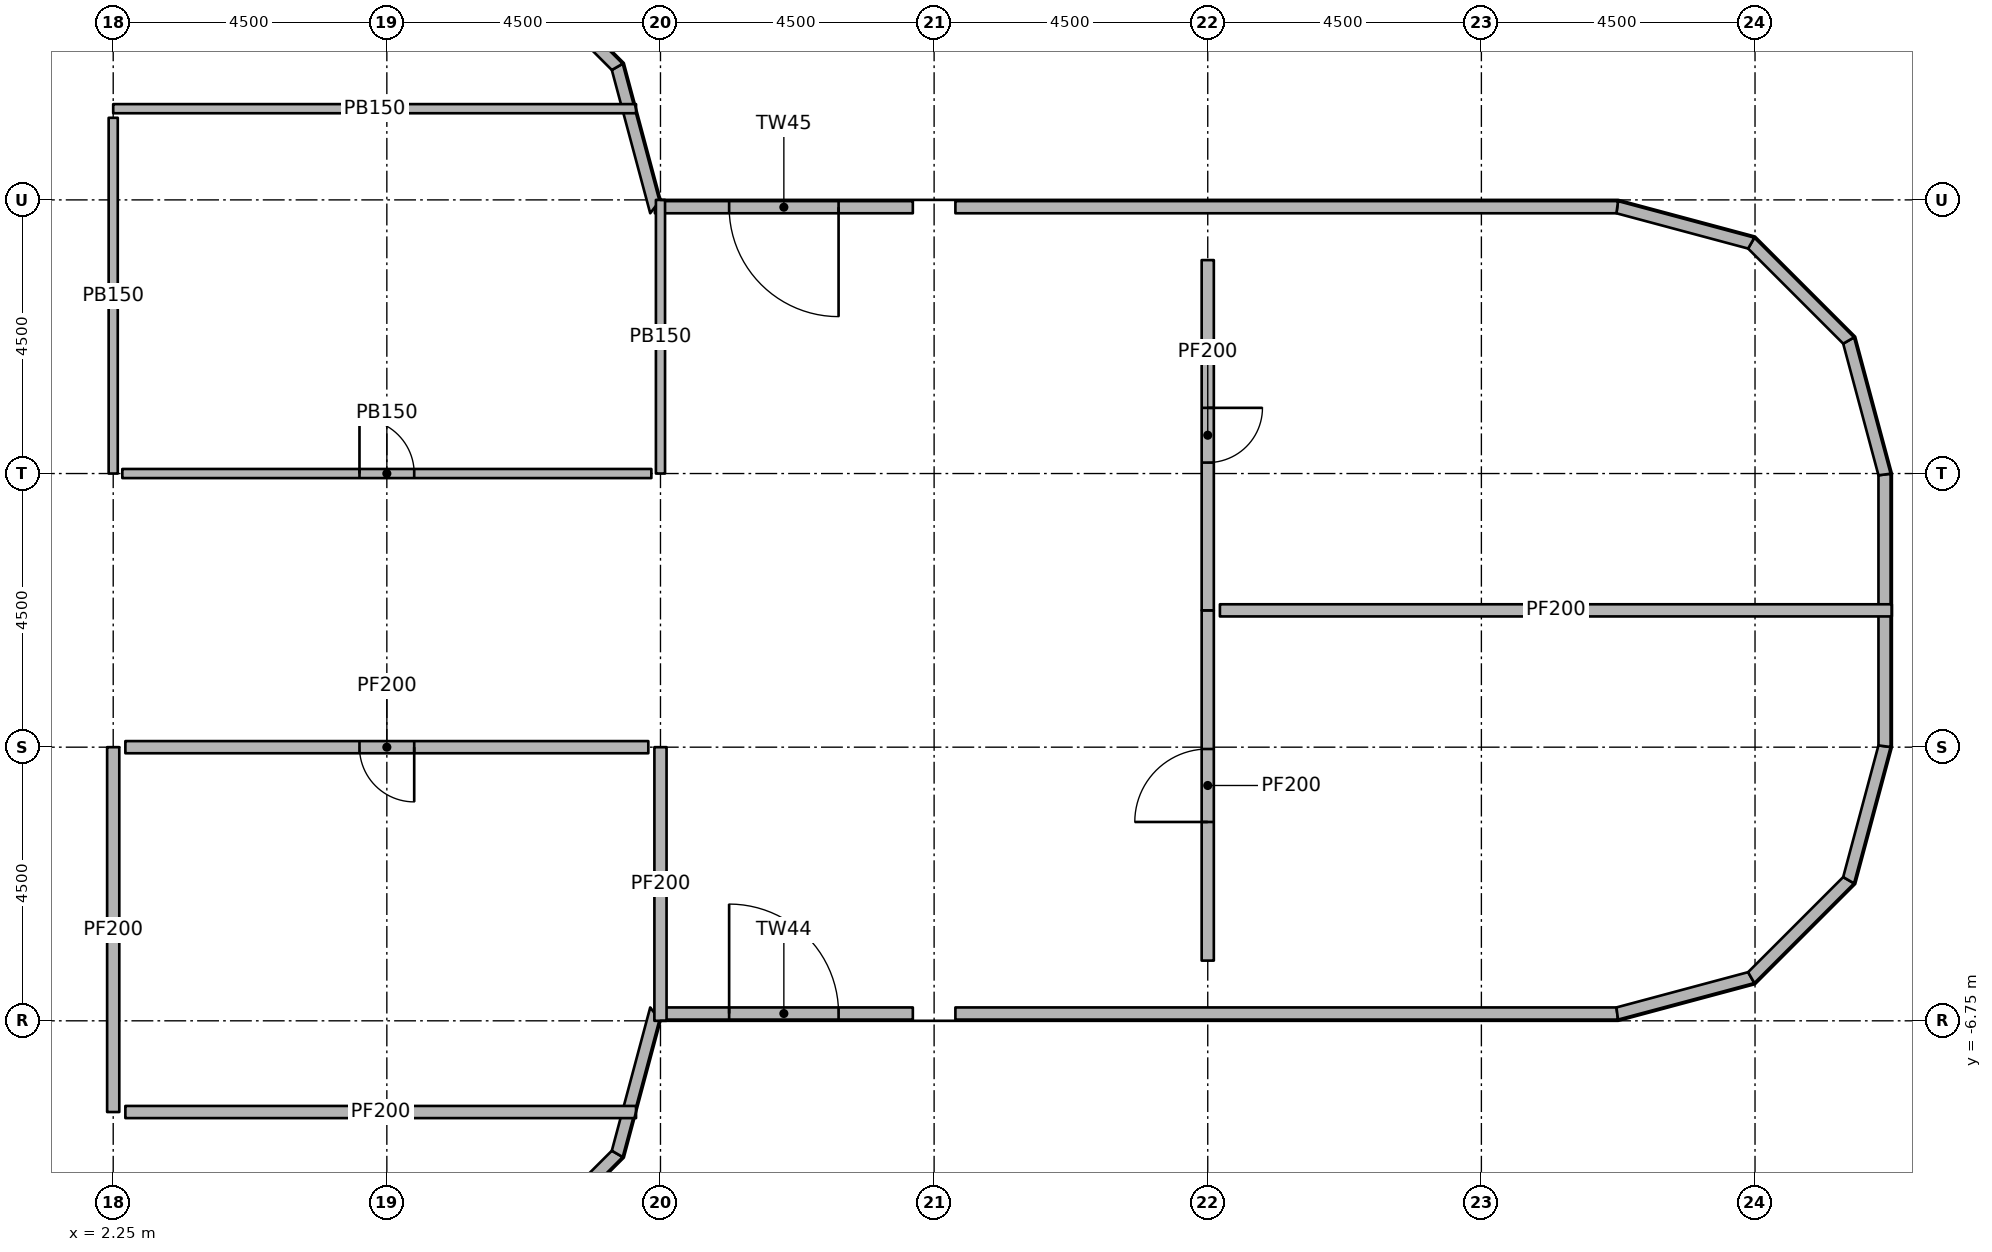
"""IFC4 building model, lengths in metres.
Left out: names, types, materials, properties, quantities, classifications, styles, units other than length and angle.
Written with IfcOpenShell. Run it as: python <this file> out.ifc"""

import sys

from ifc_helpers import new_model, si_unit, direction, frame, frame_2d, origin, origin_2d, place, context, subcontext, project, spatial, polyline, rectangle, outline, extrude, element, fill, save


model = new_model("IFC4")
c1 = context("Model", 3, precision=1e-05, world=origin(), true_north=direction((0.0, 1.0)))
c2 = subcontext(c1, "Body", "Model", "MODEL_VIEW")
j1 = project(units=[si_unit("LENGTHUNIT", "METRE"), si_unit("PLANEANGLEUNIT", "RADIAN")], contexts=[c1])
p1 = place(None, origin())
s1 = spatial("IfcSite", under=j1, at=p1, CompositionType="ELEMENT")
p2 = place(p1, origin())
s2 = spatial("IfcBuilding", under=s1, at=p2, CompositionType="ELEMENT")
p3 = place(p2, frame((0.0, 0.0, 244.8)))
s3 = spatial("IfcBuildingStorey", under=s2, at=p3, CompositionType="ELEMENT", Elevation=244.8)
for number, where, z_axis, x_axis in (
    (1, (6.25, -6.25, 0.0), (0.0, 0.0, 1.0), (1.0, 0.0, 0.0)),
    (2, (6.25, 6.25, 0.0), (0.0, 0.0, 1.0), (1.0, 0.0, 0.0)),
    (3, (10.75, -6.25, 0.0), (0.0, 0.0, 1.0), (1.0, 0.0, 0.0)),
    (4, (10.75, 6.25, 0.0), (0.0, 0.0, 1.0), (1.0, 0.0, 0.0)),
    (5, (15.75, -6.25, 0.0), (0.0, 0.0, 1.0), (1.0, 0.0, 0.0)),
    (6, (15.75, 6.25, 0.0), (0.0, 0.0, 1.0), (1.0, 0.0, 0.0)),
    (7, (20.25, -6.11, 0.0), (0.0, 0.0, 1.0), (1.0, 0.0, 0.0)),
    (8, (20.25, 6.11, 0.0), (0.0, 0.0, 1.0), (1.0, 0.0, 0.0)),
    (9, (24.75, -6.11, 0.0), (0.0, 0.0, 1.0), (1.0, 0.0, 0.0)),
    (10, (24.75, 6.11, 0.0), (0.0, 0.0, 1.0), (1.0, 0.0, 0.0)),
    (11, (28.908, -5.475, 0.0), (0.0, 0.0, 1.0), (1.0, 0.0, 0.0)),
    (12, (28.67, -2.25, 0.0), (0.0, 0.0, 1.0), (1.0, 0.0, 0.0)),
    (13, (28.67, 2.25, 0.0), (0.0, 0.0, 1.0), (1.0, 0.0, 0.0)),
    (14, (28.908, 5.475, 0.0), (0.0, 0.0, 1.0), (1.0, 0.0, 0.0)),
):
    element("IfcColumn", number, at=place(p3, frame(where, z_axis=z_axis, x_axis=x_axis)), inside=s3, PredefinedType="COLUMN", context=c2, shape_type="SweptSolid", body=[
        extrude(rectangle(XDim=0.7, YDim=0.7, at=origin_2d()), origin(), (0.0, 0.0, 1.0), 4.85),
    ])
p4 = place(p3, origin())
e15 = element("IfcWall", 15, at=p4, inside=s3, PredefinedType="SOLIDWALL", context=c2, shape_type="SweptSolid", body=[
    extrude(outline(polyline([(8.99, -10.629), (10.629, -8.99), (10.45, -8.886), (8.886, -10.45), (8.99, -10.629)])), origin(), (0.0, 0.0, 1.0), 4.85),
])
p5 = place(p3, origin())
e16 = element("IfcWall", 16, at=p5, inside=s3, PredefinedType="SOLIDWALL", context=c2, shape_type="SweptSolid", body=[
    extrude(outline(polyline([(10.629, -8.99), (11.235, -6.73), (11.081, -6.53), (10.45, -8.886), (10.629, -8.99)])), origin(), (0.0, 0.0, 1.0), 4.85),
])
p6 = place(p3, frame((11.158, -6.63, 0.0), z_axis=(0.0, 0.0, 1.0), x_axis=(1.0, 0.0, 0.0)))
e17 = element("IfcWall", 17, at=p6, inside=s3, PredefinedType="SOLIDWALL", context=c2, shape_type="SweptSolid", body=[
    extrude(rectangle(XDim=4.242, YDim=0.2, at=frame_2d((2.121, 0.0))), origin(), (0.0, 0.0, 1.0), 4.85),
])
p7 = place(p6, frame((1.221, 0.0, 0.0)))
e18 = element("IfcOpeningElement", 18, at=p7, cuts=e17, PredefinedType="OPENING", context=c2, shape_type="SweptSolid", body=[
    extrude(rectangle(XDim=1.8, YDim=2.4, at=frame_2d((0.9, 1.2))), frame((0.0, 0.11, 0.0), z_axis=(0.0, -1.0, 0.0), x_axis=(1.0, 0.0, 0.0)), (0.0, 0.0, 1.0), 0.22),
])
p8 = place(p3, origin())
e19 = element("IfcWall", 19, at=p8, inside=s3, PredefinedType="SOLIDWALL", context=c2, shape_type="SweptSolid", body=[
    extrude(outline(polyline([(16.1, -6.73), (26.997, -6.73), (26.971, -6.53), (16.1, -6.53), (16.1, -6.73)])), origin(), (0.0, 0.0, 1.0), 4.85),
])
p9 = place(p3, origin())
e20 = element("IfcWall", 20, at=p9, inside=s3, PredefinedType="SOLIDWALL", context=c2, shape_type="SweptSolid", body=[
    extrude(outline(polyline([(26.997, -6.73), (29.24, -6.129), (29.136, -5.95), (26.971, -6.53), (26.997, -6.73)])), origin(), (0.0, 0.0, 1.0), 4.85),
])
p10 = place(p3, origin())
e21 = element("IfcWall", 21, at=p10, inside=s3, PredefinedType="SOLIDWALL", context=c2, shape_type="SweptSolid", body=[
    extrude(outline(polyline([(29.24, -6.129), (30.879, -4.49), (30.7, -4.386), (29.136, -5.95), (29.24, -6.129)])), origin(), (0.0, 0.0, 1.0), 4.85),
])
p11 = place(p3, origin())
e22 = element("IfcWall", 22, at=p11, inside=s3, PredefinedType="SOLIDWALL", context=c2, shape_type="SweptSolid", body=[
    extrude(outline(polyline([(30.879, -4.49), (31.48, -2.247), (31.28, -2.221), (30.7, -4.386), (30.879, -4.49)])), origin(), (0.0, 0.0, 1.0), 4.85),
])
p12 = place(p3, origin())
e23 = element("IfcWall", 23, at=p12, inside=s3, PredefinedType="SOLIDWALL", context=c2, shape_type="SweptSolid", body=[
    extrude(outline(polyline([(31.48, -2.247), (31.48, 2.247), (31.28, 2.221), (31.28, -2.221), (31.48, -2.247)])), origin(), (0.0, 0.0, 1.0), 4.85),
])
p13 = place(p3, origin())
e24 = element("IfcWall", 24, at=p13, inside=s3, PredefinedType="SOLIDWALL", context=c2, shape_type="SweptSolid", body=[
    extrude(outline(polyline([(31.48, 2.247), (30.879, 4.49), (30.7, 4.386), (31.28, 2.221), (31.48, 2.247)])), origin(), (0.0, 0.0, 1.0), 4.85),
])
p14 = place(p3, origin())
e25 = element("IfcWall", 25, at=p14, inside=s3, PredefinedType="SOLIDWALL", context=c2, shape_type="SweptSolid", body=[
    extrude(outline(polyline([(30.879, 4.49), (29.24, 6.129), (29.136, 5.95), (30.7, 4.386), (30.879, 4.49)])), origin(), (0.0, 0.0, 1.0), 4.85),
])
p15 = place(p3, origin())
e26 = element("IfcWall", 26, at=p15, inside=s3, PredefinedType="SOLIDWALL", context=c2, shape_type="SweptSolid", body=[
    extrude(outline(polyline([(29.24, 6.129), (26.997, 6.73), (26.971, 6.53), (29.136, 5.95), (29.24, 6.129)])), origin(), (0.0, 0.0, 1.0), 4.85),
])
p16 = place(p3, origin())
e27 = element("IfcWall", 27, at=p16, inside=s3, PredefinedType="SOLIDWALL", context=c2, shape_type="SweptSolid", body=[
    extrude(outline(polyline([(26.997, 6.73), (16.1, 6.73), (16.1, 6.53), (26.971, 6.53), (26.997, 6.73)])), origin(), (0.0, 0.0, 1.0), 4.85),
])
p17 = place(p3, frame((15.4, 6.63, 0.0), z_axis=(0.0, 0.0, 1.0), x_axis=(-1.0, 0.0, 0.0)))
e28 = element("IfcWall", 28, at=p17, inside=s3, PredefinedType="SOLIDWALL", context=c2, shape_type="SweptSolid", body=[
    extrude(rectangle(XDim=4.242, YDim=0.2, at=frame_2d((2.121, 0.0))), origin(), (0.0, 0.0, 1.0), 4.85),
])
p18 = place(p17, frame((1.221, 0.0, 0.0)))
e29 = element("IfcOpeningElement", 29, at=p18, cuts=e28, PredefinedType="OPENING", context=c2, shape_type="SweptSolid", body=[
    extrude(rectangle(XDim=1.8, YDim=2.4, at=frame_2d((0.9, 1.2))), frame((0.0, 0.11, 0.0), z_axis=(0.0, -1.0, 0.0), x_axis=(1.0, 0.0, 0.0)), (0.0, 0.0, 1.0), 0.22),
])
p19 = place(p3, origin())
e30 = element("IfcWall", 30, at=p19, inside=s3, PredefinedType="SOLIDWALL", context=c2, shape_type="SweptSolid", body=[
    extrude(outline(polyline([(11.235, 6.73), (10.629, 8.99), (10.45, 8.886), (11.081, 6.53), (11.235, 6.73)])), origin(), (0.0, 0.0, 1.0), 4.85),
])
p20 = place(p3, origin())
e31 = element("IfcWall", 31, at=p20, inside=s3, PredefinedType="SOLIDWALL", context=c2, shape_type="SweptSolid", body=[
    extrude(outline(polyline([(10.629, 8.99), (8.99, 10.629), (8.886, 10.45), (10.45, 8.886), (10.629, 8.99)])), origin(), (0.0, 0.0, 1.0), 4.85),
])
p21 = place(p3, frame((10.848, 8.25, 0.0), z_axis=(0.0, 0.0, 1.0), x_axis=(-1.0, 0.0, 0.0)))
e32 = element("IfcWall", 32, at=p21, inside=s3, PredefinedType="PARTITIONING", context=c2, shape_type="SweptSolid", body=[
    extrude(rectangle(XDim=8.598, YDim=0.15, at=frame_2d((4.299, 0.0))), origin(), (0.0, 0.0, 1.0), 3.93),
])
p22 = place(p3, frame((2.25, 8.1, 0.0), z_axis=(0.0, 0.0, 1.0), x_axis=(0.0, -1.0, 0.0)))
e33 = element("IfcWall", 33, at=p22, inside=s3, PredefinedType="PARTITIONING", context=c2, shape_type="SweptSolid", body=[
    extrude(rectangle(XDim=5.85, YDim=0.15, at=frame_2d((2.925, 0.0))), origin(), (0.0, 0.0, 1.0), 4.073),
])
p23 = place(p3, frame((2.25, -2.25, 0.0), z_axis=(0.0, 0.0, 1.0), x_axis=(0.0, -1.0, 0.0)))
e34 = element("IfcWall", 34, at=p23, inside=s3, PredefinedType="PARTITIONING", context=c2, shape_type="SweptSolid", body=[
    extrude(rectangle(XDim=6.0, YDim=0.2, at=frame_2d((3.0, 0.0))), origin(), (0.0, 0.0, 1.0), 4.073),
])
p24 = place(p3, frame((2.45, -8.25, 0.0), z_axis=(0.0, 0.0, 1.0), x_axis=(1.0, 0.0, 0.0)))
e35 = element("IfcWall", 35, at=p24, inside=s3, PredefinedType="PARTITIONING", context=c2, shape_type="SweptSolid", body=[
    extrude(rectangle(XDim=8.398, YDim=0.2, at=frame_2d((4.199, 0.0))), origin(), (0.0, 0.0, 1.0), 3.93),
])
p25 = place(p3, frame((11.25, 6.75, 0.0), z_axis=(0.0, 0.0, 1.0), x_axis=(0.0, -1.0, 0.0)))
e36 = element("IfcWall", 36, at=p25, inside=s3, PredefinedType="PARTITIONING", context=c2, shape_type="SweptSolid", body=[
    extrude(rectangle(XDim=4.5, YDim=0.15, at=frame_2d((2.25, 0.0))), origin(), (0.0, 0.0, 1.0), 3.93),
])
p26 = place(p3, frame((2.4, 2.25, 0.0), z_axis=(0.0, 0.0, 1.0), x_axis=(1.0, 0.0, 0.0)))
e37 = element("IfcWall", 37, at=p26, inside=s3, PredefinedType="PARTITIONING", context=c2, shape_type="SweptSolid", body=[
    extrude(rectangle(XDim=8.7, YDim=0.15, at=frame_2d((4.35, 0.0))), origin(), (0.0, 0.0, 1.0), 4.223),
])
p27 = place(p26, frame((3.9, 0.0, 0.0)))
e38 = element("IfcOpeningElement", 38, at=p27, cuts=e37, PredefinedType="OPENING", context=c2, shape_type="SweptSolid", body=[
    extrude(rectangle(XDim=0.9, YDim=2.1, at=frame_2d((0.45, 1.05))), frame((0.0, 0.085, 0.0), z_axis=(0.0, -1.0, 0.0), x_axis=(1.0, 0.0, 0.0)), (0.0, 0.0, 1.0), 0.17),
])
p28 = place(p3, frame((11.25, -2.25, 0.0), z_axis=(0.0, 0.0, 1.0), x_axis=(0.0, -1.0, 0.0)))
e39 = element("IfcWall", 39, at=p28, inside=s3, PredefinedType="PARTITIONING", context=c2, shape_type="SweptSolid", body=[
    extrude(rectangle(XDim=4.5, YDim=0.2, at=frame_2d((2.25, 0.0))), origin(), (0.0, 0.0, 1.0), 3.93),
])
p29 = place(p3, frame((11.05, -2.25, 0.0), z_axis=(0.0, 0.0, 1.0), x_axis=(-1.0, 0.0, 0.0)))
e40 = element("IfcWall", 40, at=p29, inside=s3, PredefinedType="PARTITIONING", context=c2, shape_type="SweptSolid", body=[
    extrude(rectangle(XDim=8.6, YDim=0.2, at=frame_2d((4.3, 0.0))), origin(), (0.0, 0.0, 1.0), 4.223),
])
p30 = place(p29, frame((3.85, 0.0, 0.0)))
e41 = element("IfcOpeningElement", 41, at=p30, cuts=e40, PredefinedType="OPENING", context=c2, shape_type="SweptSolid", body=[
    extrude(rectangle(XDim=0.9, YDim=2.1, at=frame_2d((0.45, 1.05))), frame((0.0, 0.11, 0.0), z_axis=(0.0, -1.0, 0.0), x_axis=(1.0, 0.0, 0.0)), (0.0, 0.0, 1.0), 0.22),
])
p31 = place(p3, frame((20.25, -5.76, 0.0), z_axis=(0.0, 0.0, 1.0), x_axis=(0.0, 1.0, 0.0)))
e42 = element("IfcWall", 42, at=p31, inside=s3, PredefinedType="PARTITIONING", context=c2, shape_type="SweptSolid", body=[
    extrude(rectangle(XDim=5.76, YDim=0.2, at=frame_2d((2.88, 0.0))), origin(), (0.0, 0.0, 1.0), 4.223),
])
p32 = place(p31, frame((2.28, 0.0, 0.0)))
e43 = element("IfcOpeningElement", 43, at=p32, cuts=e42, PredefinedType="OPENING", context=c2, shape_type="SweptSolid", body=[
    extrude(rectangle(XDim=1.2, YDim=2.1, at=frame_2d((0.6, 1.05))), frame((0.0, 0.11, 0.0), z_axis=(0.0, -1.0, 0.0), x_axis=(1.0, 0.0, 0.0)), (0.0, 0.0, 1.0), 0.22),
])
p33 = place(p3, frame((20.25, 5.76, 0.0), z_axis=(0.0, 0.0, 1.0), x_axis=(0.0, -1.0, 0.0)))
e44 = element("IfcWall", 44, at=p33, inside=s3, PredefinedType="PARTITIONING", context=c2, shape_type="SweptSolid", body=[
    extrude(rectangle(XDim=5.76, YDim=0.2, at=frame_2d((2.88, 0.0))), origin(), (0.0, 0.0, 1.0), 4.223),
])
p34 = place(p33, frame((2.43, 0.0, 0.0)))
e45 = element("IfcOpeningElement", 45, at=p34, cuts=e44, PredefinedType="OPENING", context=c2, shape_type="SweptSolid", body=[
    extrude(rectangle(XDim=0.9, YDim=2.1, at=frame_2d((0.45, 1.05))), frame((0.0, 0.11, 0.0), z_axis=(0.0, -1.0, 0.0), x_axis=(1.0, 0.0, 0.0)), (0.0, 0.0, 1.0), 0.22),
])
p35 = place(p3, frame((20.45, 0.0, 0.0), z_axis=(0.0, 0.0, 1.0), x_axis=(1.0, 0.0, 0.0)))
e46 = element("IfcWall", 46, at=p35, inside=s3, PredefinedType="PARTITIONING", context=c2, shape_type="SweptSolid", body=[
    extrude(rectangle(XDim=11.05, YDim=0.2, at=frame_2d((5.525, 0.0))), origin(), (0.0, 0.0, 1.0), 3.93),
])
p36 = place(p7, origin())
e47 = element("IfcDoor", 47, at=p36, inside=s3, OperationType="SINGLE_SWING_LEFT", PredefinedType="DOOR", context=c2, shape_type="SweptSolid", body=[
    extrude(rectangle(XDim=1.8, YDim=2.4, at=frame_2d((0.9, 1.2))), frame((0.0, 0.025, 0.0), z_axis=(0.0, -1.0, 0.0), x_axis=(1.0, 0.0, 0.0)), (0.0, 0.0, 1.0), 0.05),
])
fill(e18, e47)
p37 = place(p18, origin())
e48 = element("IfcDoor", 48, at=p37, inside=s3, OperationType="SINGLE_SWING_LEFT", PredefinedType="DOOR", context=c2, shape_type="SweptSolid", body=[
    extrude(rectangle(XDim=1.8, YDim=2.4, at=frame_2d((0.9, 1.2))), frame((0.0, 0.025, 0.0), z_axis=(0.0, -1.0, 0.0), x_axis=(1.0, 0.0, 0.0)), (0.0, 0.0, 1.0), 0.05),
])
fill(e29, e48)
p38 = place(p27, origin())
e49 = element("IfcDoor", 49, at=p38, inside=s3, OperationType="SINGLE_SWING_LEFT", PredefinedType="DOOR", context=c2, shape_type="SweptSolid", body=[
    extrude(rectangle(XDim=0.9, YDim=2.1, at=frame_2d((0.45, 1.05))), frame((0.0, 0.025, 0.0), z_axis=(0.0, -1.0, 0.0), x_axis=(1.0, 0.0, 0.0)), (0.0, 0.0, 1.0), 0.05),
])
fill(e38, e49)
p39 = place(p30, origin())
e50 = element("IfcDoor", 50, at=p39, inside=s3, OperationType="SINGLE_SWING_LEFT", PredefinedType="DOOR", context=c2, shape_type="SweptSolid", body=[
    extrude(rectangle(XDim=0.9, YDim=2.1, at=frame_2d((0.45, 1.05))), frame((0.0, 0.025, 0.0), z_axis=(0.0, -1.0, 0.0), x_axis=(1.0, 0.0, 0.0)), (0.0, 0.0, 1.0), 0.05),
])
fill(e41, e50)
p40 = place(p32, origin())
e51 = element("IfcDoor", 51, at=p40, inside=s3, OperationType="SINGLE_SWING_LEFT", PredefinedType="DOOR", context=c2, shape_type="SweptSolid", body=[
    extrude(rectangle(XDim=1.2, YDim=2.1, at=frame_2d((0.6, 1.05))), frame((0.0, 0.025, 0.0), z_axis=(0.0, -1.0, 0.0), x_axis=(1.0, 0.0, 0.0)), (0.0, 0.0, 1.0), 0.05),
])
fill(e43, e51)
p41 = place(p34, origin())
e52 = element("IfcDoor", 52, at=p41, inside=s3, OperationType="SINGLE_SWING_LEFT", PredefinedType="DOOR", context=c2, shape_type="SweptSolid", body=[
    extrude(rectangle(XDim=0.9, YDim=2.1, at=frame_2d((0.45, 1.05))), frame((0.0, 0.025, 0.0), z_axis=(0.0, -1.0, 0.0), x_axis=(1.0, 0.0, 0.0)), (0.0, 0.0, 1.0), 0.05),
])
fill(e45, e52)
save(model, sys.argv[1])
